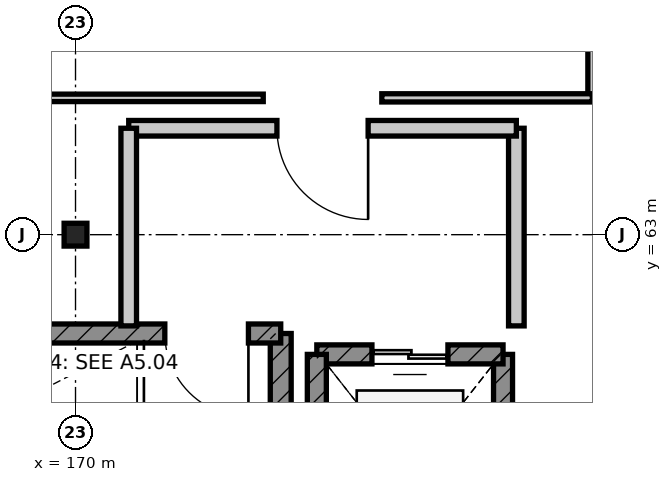
"""IFC4 building model, lengths in metres.
Left out: names, types, materials, properties, quantities, classifications, styles, units other than length and angle.
Written with IfcOpenShell. Run it as: python <this file> out.ifc"""

import sys

from ifc_helpers import new_model, si_unit, direction, frame, frame_2d, origin, origin_2d, place, context, subcontext, project, spatial, rectangle, i_section, extrude, element, fill, save


model = new_model("IFC4")
c1 = context("Model", 3, precision=1e-05, world=origin(), true_north=direction((0.0, 1.0)))
c2 = subcontext(c1, "Body", "Model", "MODEL_VIEW")
j1 = project(units=[si_unit("LENGTHUNIT", "METRE"), si_unit("PLANEANGLEUNIT", "RADIAN")], contexts=[c1])
p1 = place(None, origin())
s1 = spatial("IfcSite", under=j1, at=p1, CompositionType="ELEMENT")
p2 = place(p1, origin())
s2 = spatial("IfcBuilding", under=s1, at=p2, CompositionType="ELEMENT")
p3 = place(p2, frame((0.0, 0.0, 19.2)))
s3 = spatial("IfcBuildingStorey", under=s2, at=p3, CompositionType="ELEMENT", Elevation=19.2)
p4 = place(p3, frame((170.0, 63.0, 0.0), z_axis=(0.0, 0.0, 1.0), x_axis=(1.0, 0.0, 0.0)))
e1 = element("IfcColumn", 1, at=p4, inside=s3, PredefinedType="COLUMN", context=c2, shape_type="SweptSolid", body=[
    extrude(i_section(OverallWidth=0.3, OverallDepth=0.3, WebThickness=0.011, FlangeThickness=0.019, FilletRadius=0.027, at=origin_2d()), origin(), (0.0, 0.0, 1.0), 3.6),
])
p5 = place(p3, frame((172.7, 58.1, 0.0), z_axis=(0.0, 0.0, 1.0), x_axis=(0.0, 1.0, 0.0)))
e2 = element("IfcWall", 2, at=p5, inside=s3, PredefinedType="SHEAR", context=c2, shape_type="SweptSolid", body=[
    extrude(rectangle(XDim=3.6, YDim=0.275, at=frame_2d((1.8, 0.0))), origin(), (0.0, 0.0, 1.0), 3.35),
])
p6 = place(p3, frame((172.7, 61.7, 0.0), z_axis=(0.0, 0.0, 1.0), x_axis=(-1.0, 0.0, 0.0)))
e3 = element("IfcWall", 3, at=p6, inside=s3, PredefinedType="SHEAR", context=c2, shape_type="SweptSolid", body=[
    extrude(rectangle(XDim=8.6, YDim=0.25, at=frame_2d((4.3, 0.0))), origin(), (0.0, 0.0, 1.0), 3.35),
])
p7 = place(p6, frame((0.425, 0.0, 0.0)))
e4 = element("IfcOpeningElement", 4, at=p7, cuts=e3, PredefinedType="OPENING", context=c2, shape_type="SweptSolid", body=[
    extrude(rectangle(XDim=1.1, YDim=2.1, at=frame_2d((0.55, 1.05))), frame((0.0, 0.135, 0.0), z_axis=(0.0, -1.0, 0.0), x_axis=(1.0, 0.0, 0.0)), (0.0, 0.0, 1.0), 0.27),
])
p8 = place(p3, frame((175.625, 58.375, 0.0), z_axis=(0.0, 0.0, 1.0), x_axis=(0.0, 1.0, 0.0)))
e5 = element("IfcWall", 5, at=p8, inside=s3, PredefinedType="SHEAR", context=c2, shape_type="SweptSolid", body=[
    extrude(rectangle(XDim=3.05, YDim=0.25, at=frame_2d((1.525, 0.0))), origin(), (0.0, 0.0, 1.0), 3.35),
])
p9 = place(p3, frame((175.625, 61.425, 0.0), z_axis=(0.0, 0.0, 1.0), x_axis=(-1.0, 0.0, 0.0)))
e6 = element("IfcWall", 6, at=p9, inside=s3, PredefinedType="SHEAR", context=c2, shape_type="SweptSolid", body=[
    extrude(rectangle(XDim=2.45, YDim=0.25, at=frame_2d((1.225, 0.0))), origin(), (0.0, 0.0, 1.0), 3.35),
])
p10 = place(p9, frame((0.725, 0.0, 0.0)))
e7 = element("IfcOpeningElement", 7, at=p10, cuts=e6, PredefinedType="OPENING", context=c2, shape_type="SweptSolid", body=[
    extrude(rectangle(XDim=1.0, YDim=2.15, at=frame_2d((0.5, 1.075))), frame((0.0, 0.135, 0.0), z_axis=(0.0, -1.0, 0.0), x_axis=(1.0, 0.0, 0.0)), (0.0, 0.0, 1.0), 0.27),
])
p11 = place(p3, frame((173.175, 61.425, 0.0), z_axis=(0.0, 0.0, 1.0), x_axis=(0.0, -1.0, 0.0)))
e8 = element("IfcWall", 8, at=p11, inside=s3, PredefinedType="SHEAR", context=c2, shape_type="SweptSolid", body=[
    extrude(rectangle(XDim=3.05, YDim=0.25, at=frame_2d((1.525, 0.0))), origin(), (0.0, 0.0, 1.0), 3.35),
])
p12 = place(p3, frame((175.8, 61.8, 0.0), z_axis=(0.0, 0.0, 1.0), x_axis=(0.0, 1.0, 0.0)))
e9 = element("IfcWall", 9, at=p12, inside=s3, PredefinedType="PARTITIONING", context=c2, shape_type="SweptSolid", body=[
    extrude(rectangle(XDim=2.6, YDim=0.205, at=frame_2d((1.3, 0.0))), origin(), (0.0, 0.0, 1.0), 2.926),
])
p13 = place(p3, frame((175.8, 64.4, 0.0), z_axis=(0.0, 0.0, 1.0), x_axis=(-1.0, 0.0, 0.0)))
e10 = element("IfcWall", 10, at=p13, inside=s3, PredefinedType="PARTITIONING", context=c2, shape_type="SweptSolid", body=[
    extrude(rectangle(XDim=5.1, YDim=0.205, at=frame_2d((2.55, 0.0))), origin(), (0.0, 0.0, 1.0), 3.35),
])
p14 = place(p13, frame((1.95, 0.0, 0.0)))
e11 = element("IfcOpeningElement", 11, at=p14, cuts=e10, PredefinedType="OPENING", context=c2, shape_type="SweptSolid", body=[
    extrude(rectangle(XDim=1.2, YDim=2.1, at=frame_2d((0.6, 1.05))), frame((0.0, 0.113, 0.0), z_axis=(0.0, -1.0, 0.0), x_axis=(1.0, 0.0, 0.0)), (0.0, 0.0, 1.0), 0.225),
])
p15 = place(p3, frame((170.7, 64.4, 0.0), z_axis=(0.0, 0.0, 1.0), x_axis=(0.0, -1.0, 0.0)))
e12 = element("IfcWall", 12, at=p15, inside=s3, PredefinedType="PARTITIONING", context=c2, shape_type="SweptSolid", body=[
    extrude(rectangle(XDim=2.6, YDim=0.205, at=frame_2d((1.3, 0.0))), origin(), (0.0, 0.0, 1.0), 2.926),
])
p16 = place(p3, frame((176.8, 72.72, 0.0), z_axis=(0.0, 0.0, 1.0), x_axis=(0.0, -1.0, 0.0)))
e13 = element("IfcWall", 13, at=p16, inside=s3, PredefinedType="PARTITIONING", context=c2, shape_type="SweptSolid", body=[
    extrude(rectangle(XDim=7.92, YDim=0.118, at=frame_2d((3.96, 0.0))), origin(), (0.0, 0.0, 1.0), 2.926),
])
p17 = place(p3, frame((176.8, 64.8, 0.0), z_axis=(0.0, 0.0, 1.0), x_axis=(-1.0, 0.0, 0.0)))
e14 = element("IfcWall", 14, at=p17, inside=s3, PredefinedType="PARTITIONING", context=c2, shape_type="SweptSolid", body=[
    extrude(rectangle(XDim=2.77, YDim=0.108, at=frame_2d((1.385, 0.0))), origin(), (0.0, 0.0, 1.0), 3.35),
])
p18 = place(p3, frame((172.47, 64.8, 0.0), z_axis=(0.0, 0.0, 1.0), x_axis=(-1.0, 0.0, 0.0)))
e15 = element("IfcWall", 15, at=p18, inside=s3, PredefinedType="PARTITIONING", context=c2, shape_type="SweptSolid", body=[
    extrude(rectangle(XDim=45.27, YDim=0.098, at=frame_2d((22.635, 0.0))), origin(), (0.0, 0.0, 1.0), 2.926),
])
p19 = place(p18, frame((22.11, 0.0, 0.0)))
e16 = element("IfcOpeningElement", 16, at=p19, cuts=e15, PredefinedType="OPENING", context=c2, shape_type="SweptSolid", body=[
    extrude(rectangle(XDim=1.05, YDim=2.18, at=frame_2d((0.525, 1.09))), frame((0.0, 0.059, 0.0), z_axis=(0.0, -1.0, 0.0), x_axis=(1.0, 0.0, 0.0)), (0.0, 0.0, 1.0), 0.118),
])
p20 = place(p7, origin())
e17 = element("IfcDoor", 17, at=p20, inside=s3, OperationType="SINGLE_SWING_LEFT", PredefinedType="DOOR", context=c2, shape_type="SweptSolid", body=[
    extrude(rectangle(XDim=1.1, YDim=2.1, at=frame_2d((0.55, 1.05))), frame((0.0, 0.025, 0.0), z_axis=(0.0, -1.0, 0.0), x_axis=(1.0, 0.0, 0.0)), (0.0, 0.0, 1.0), 0.05),
])
fill(e4, e17)
p21 = place(p10, origin())
e18 = element("IfcDoor", 18, at=p21, inside=s3, OperationType="DOUBLE_DOOR_SLIDING", PredefinedType="DOOR", context=c2, shape_type="SweptSolid", body=[
    extrude(rectangle(XDim=1.0, YDim=2.15, at=frame_2d((0.5, 1.075))), frame((0.0, 0.025, 0.0), z_axis=(0.0, -1.0, 0.0), x_axis=(1.0, 0.0, 0.0)), (0.0, 0.0, 1.0), 0.05),
])
fill(e7, e18)
p22 = place(p14, origin())
e19 = element("IfcDoor", 19, at=p22, inside=s3, OperationType="SINGLE_SWING_LEFT", PredefinedType="DOOR", context=c2, shape_type="SweptSolid", body=[
    extrude(rectangle(XDim=1.2, YDim=2.1, at=frame_2d((0.6, 1.05))), frame((0.0, 0.025, 0.0), z_axis=(0.0, -1.0, 0.0), x_axis=(1.0, 0.0, 0.0)), (0.0, 0.0, 1.0), 0.05),
])
fill(e11, e19)
save(model, sys.argv[1])
